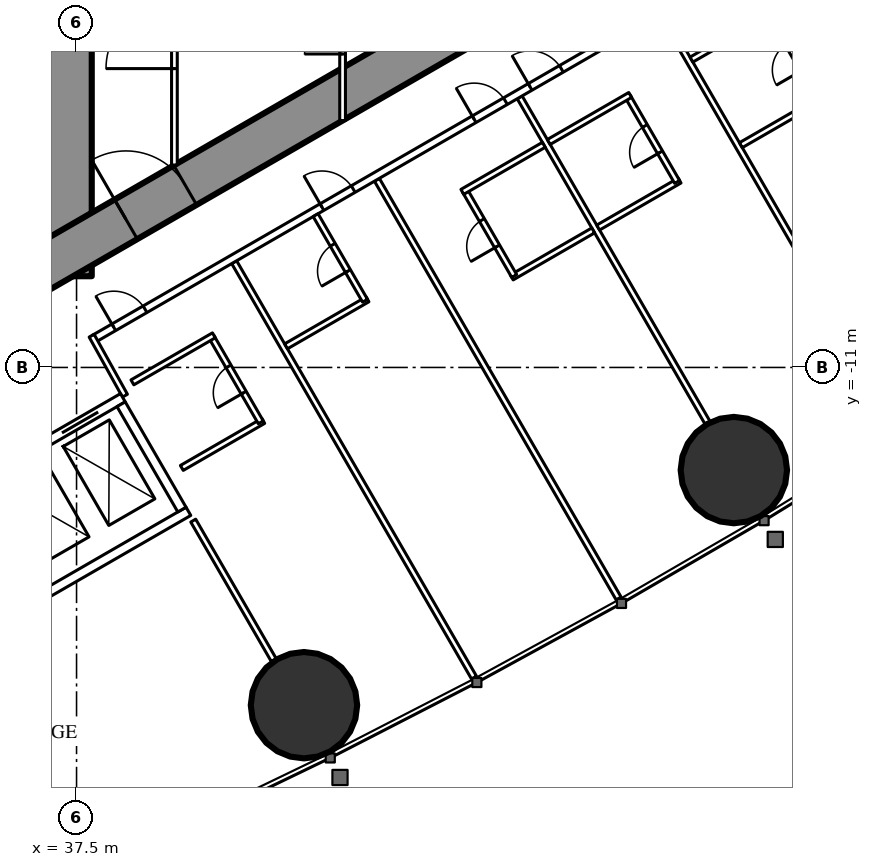
"""IFC4 building model, lengths in metres.
Left out: names, types, materials, properties, quantities, classifications, styles, units other than length and angle.
Written with IfcOpenShell. Run it as: python <this file> out.ifc"""

import sys

from ifc_helpers import new_model, si_unit, direction, frame, frame_2d, origin, origin_2d, place, context, subcontext, project, spatial, rectangle, hollow_circle, extrude, element, fill, save


model = new_model("IFC4")
c1 = context("Model", 3, precision=1e-05, world=origin(), true_north=direction((0.0, 1.0)))
c2 = subcontext(c1, "Body", "Model", "MODEL_VIEW")
j1 = project(units=[si_unit("LENGTHUNIT", "METRE"), si_unit("PLANEANGLEUNIT", "RADIAN")], contexts=[c1])
p1 = place(None, origin())
s1 = spatial("IfcSite", under=j1, at=p1, CompositionType="ELEMENT")
p2 = place(p1, origin())
s2 = spatial("IfcBuilding", under=s1, at=p2, CompositionType="ELEMENT")
p3 = place(p2, frame((0.0, 0.0, 49.5)))
s3 = spatial("IfcBuildingStorey", under=s2, at=p3, CompositionType="ELEMENT", Elevation=49.5)
for number, where, z_axis, x_axis in (
    (1, (43.484, -19.886, 0.0), (0.0, 0.0, 1.0), (1.0, 0.0, 0.0)),
    (2, (54.795, -13.701, 0.0), (0.0, 0.0, 1.0), (1.0, 0.0, 0.0)),
):
    element("IfcColumn", number, at=place(p3, frame(where, z_axis=z_axis, x_axis=x_axis)), inside=s3, PredefinedType="COLUMN", context=c2, shape_type="SweptSolid", body=[
        extrude(hollow_circle(Radius=1.4, WallThickness=0.12, at=origin_2d()), origin(), (0.0, 0.0, 1.0), 3.5),
    ])
p4 = place(p3, frame((37.3, -8.6, 0.0), z_axis=(0.0, 0.0, 1.0), x_axis=(0.0, 1.0, 0.0)))
e3 = element("IfcWall", 3, at=p4, inside=s3, PredefinedType="SHEAR", context=c2, shape_type="SweptSolid", body=[
    extrude(rectangle(XDim=17.2, YDim=1.2, at=frame_2d((8.6, 0.0))), origin(), (0.0, 0.0, 1.0), 3.5),
])
p5 = place(p4, frame((7.7, 0.0, 0.0)))
e4 = element("IfcOpeningElement", 4, at=p5, cuts=e3, PredefinedType="OPENING", context=c2, shape_type="SweptSolid", body=[
    extrude(rectangle(XDim=1.8, YDim=2.2, at=frame_2d((0.9, 1.1))), frame((0.0, 0.61, 0.0), z_axis=(0.0, -1.0, 0.0), x_axis=(1.0, 0.0, 0.0)), (0.0, 0.0, 1.0), 1.22),
])
p6 = place(p3, frame((27.2, -13.8, 0.0), z_axis=(0.0, 0.0, 1.0), x_axis=(0.866027159892, 0.499996958321, 0.0)))
e5 = element("IfcWall", 5, at=p6, inside=s3, PredefinedType="SHEAR", context=c2, shape_type="SweptSolid", body=[
    extrude(rectangle(XDim=27.947, YDim=1.2, at=frame_2d((13.973, 0.0))), origin(), (0.0, 0.0, 1.0), 3.5),
])
p7 = place(p6, frame((4.6, 0.0, 0.0)))
e6 = element("IfcOpeningElement", 6, at=p7, cuts=e5, PredefinedType="OPENING", context=c2, shape_type="SweptSolid", body=[
    extrude(rectangle(XDim=1.0, YDim=2.2, at=frame_2d((0.5, 1.1))), frame((0.0, 0.61, 0.0), z_axis=(0.0, -1.0, 0.0), x_axis=(1.0, 0.0, 0.0)), (0.0, 0.0, 1.0), 1.22),
])
p8 = place(p6, frame((13.395, 0.0, 0.0)))
e7 = element("IfcOpeningElement", 7, at=p8, cuts=e5, PredefinedType="OPENING", context=c2, shape_type="SweptSolid", body=[
    extrude(rectangle(XDim=1.8, YDim=2.2, at=frame_2d((0.9, 1.1))), frame((0.0, 0.61, 0.0), z_axis=(0.0, -1.0, 0.0), x_axis=(1.0, 0.0, 0.0)), (0.0, 0.0, 1.0), 1.22),
])
p9 = place(p3, frame((41.647, -8.23, 0.0), z_axis=(0.0, 0.0, 1.0), x_axis=(0.49998590462, -0.866033541603, 0.0)))
e8 = element("IfcWall", 8, at=p9, inside=s3, PredefinedType="PARTITIONING", context=c2, shape_type="SweptSolid", body=[
    extrude(rectangle(XDim=12.621, YDim=0.15, at=frame_2d((6.311, 0.0))), origin(), (0.0, 0.0, 1.0), 3.25),
])
p10 = place(p3, frame((45.403, -6.062, 0.0), z_axis=(0.0, 0.0, 1.0), x_axis=(0.500007077968, -0.866021317279, 0.0)))
e9 = element("IfcWall", 9, at=p10, inside=s3, PredefinedType="PARTITIONING", context=c2, shape_type="SweptSolid", body=[
    extrude(rectangle(XDim=12.721, YDim=0.15, at=frame_2d((6.361, 0.0))), origin(), (0.0, 0.0, 1.0), 3.25),
])
p11 = place(p3, frame((49.159, -3.893, 0.0), z_axis=(0.0, 0.0, 1.0), x_axis=(0.499998773722, -0.866026111775, 0.0)))
e10 = element("IfcWall", 10, at=p11, inside=s3, PredefinedType="PARTITIONING", context=c2, shape_type="SweptSolid", body=[
    extrude(rectangle(XDim=9.892, YDim=0.15, at=frame_2d((4.946, 0.0))), origin(), (0.0, 0.0, 1.0), 2.25),
])
p12 = place(p3, frame((52.915, -1.725, 0.0), z_axis=(0.0, 0.0, 1.0), x_axis=(0.499997163113, -0.866027041656, 0.0)))
e11 = element("IfcWall", 11, at=p12, inside=s3, PredefinedType="PARTITIONING", context=c2, shape_type="SweptSolid", body=[
    extrude(rectangle(XDim=12.591, YDim=0.15, at=frame_2d((6.295, 0.0))), origin(), (0.0, 0.0, 1.0), 3.25),
])
p13 = place(p3, frame((40.57, -15.03, 0.0), z_axis=(0.0, 0.0, 1.0), x_axis=(0.500012993597, -0.866017901798, 0.0)))
e12 = element("IfcWall", 12, at=p13, inside=s3, PredefinedType="PARTITIONING", context=c2, shape_type="SweptSolid", body=[
    extrude(rectangle(XDim=4.243, YDim=0.15, at=frame_2d((2.122, 0.0))), origin(), (0.0, 0.0, 1.0), 3.25),
])
p14 = place(p3, frame((37.96, -10.243, 0.0), z_axis=(0.0, 0.0, 1.0), x_axis=(0.866026429433, 0.499998223521, 0.0)))
e13 = element("IfcWall", 13, at=p14, inside=s3, PredefinedType="PARTITIONING", context=c2, shape_type="SweptSolid", body=[
    extrude(rectangle(XDim=20.487, YDim=0.2, at=frame_2d((10.243, 0.0))), origin(), (0.0, 0.0, 1.0), 3.25),
])
p15 = place(p14, frame((6.925, 0.0, 0.0)))
e14 = element("IfcOpeningElement", 14, at=p15, cuts=e13, PredefinedType="OPENING", context=c2, shape_type="SweptSolid", body=[
    extrude(rectangle(XDim=0.95, YDim=2.2, at=frame_2d((0.475, 1.1))), frame((0.0, 0.11, 0.0), z_axis=(0.0, -1.0, 0.0), x_axis=(1.0, 0.0, 0.0)), (0.0, 0.0, 1.0), 0.22),
])
p16 = place(p14, frame((11.549, 0.0, 0.0)))
e15 = element("IfcOpeningElement", 15, at=p16, cuts=e13, PredefinedType="OPENING", context=c2, shape_type="SweptSolid", body=[
    extrude(rectangle(XDim=0.95, YDim=2.2, at=frame_2d((0.475, 1.1))), frame((0.0, 0.11, 0.0), z_axis=(0.0, -1.0, 0.0), x_axis=(1.0, 0.0, 0.0)), (0.0, 0.0, 1.0), 0.22),
])
p17 = place(p14, frame((13.249, 0.0, 0.0)))
e16 = element("IfcOpeningElement", 16, at=p17, cuts=e13, PredefinedType="OPENING", context=c2, shape_type="SweptSolid", body=[
    extrude(rectangle(XDim=0.95, YDim=2.2, at=frame_2d((0.475, 1.1))), frame((0.0, 0.11, 0.0), z_axis=(0.0, -1.0, 0.0), x_axis=(1.0, 0.0, 0.0)), (0.0, 0.0, 1.0), 0.22),
])
p18 = place(p14, frame((17.585, 0.0, 0.0)))
e17 = element("IfcOpeningElement", 17, at=p18, cuts=e13, PredefinedType="OPENING", context=c2, shape_type="SweptSolid", body=[
    extrude(rectangle(XDim=0.95, YDim=2.2, at=frame_2d((0.475, 1.1))), frame((0.0, 0.11, 0.0), z_axis=(0.0, -1.0, 0.0), x_axis=(1.0, 0.0, 0.0)), (0.0, 0.0, 1.0), 0.22),
])
p19 = place(p14, frame((0.6, 0.0, 0.0)))
e18 = element("IfcOpeningElement", 18, at=p19, cuts=e13, PredefinedType="OPENING", context=c2, shape_type="SweptSolid", body=[
    extrude(rectangle(XDim=0.95, YDim=2.2, at=frame_2d((0.475, 1.1))), frame((0.0, 0.11, 0.0), z_axis=(0.0, -1.0, 0.0), x_axis=(1.0, 0.0, 0.0)), (0.0, 0.0, 1.0), 0.22),
])
p20 = place(p3, frame((38.773, -11.742, 0.0), z_axis=(0.0, 0.0, 1.0), x_axis=(-0.485528096672, 0.8742210632, 0.0)))
e19 = element("IfcWall", 19, at=p20, inside=s3, PredefinedType="PARTITIONING", context=c2, shape_type="SweptSolid", body=[
    extrude(rectangle(XDim=1.805, YDim=0.15, at=frame_2d((0.903, 0.0))), origin(), (0.0, 0.0, 1.0), 3.25),
])
p21 = place(p3, frame((43.012, -10.444, 0.0), z_axis=(0.0, 0.0, 1.0), x_axis=(0.866031185235, 0.4999899861, 0.0)))
e20 = element("IfcWall", 20, at=p21, inside=s3, PredefinedType="PARTITIONING", context=c2, shape_type="SweptSolid", body=[
    extrude(rectangle(XDim=2.475, YDim=0.15, at=frame_2d((1.238, 0.0))), origin(), (0.0, 0.0, 1.0), 3.25),
])
p22 = place(p3, frame((43.791, -6.993, 0.0), z_axis=(0.0, 0.0, 1.0), x_axis=(0.500047596559, -0.865997922154, 0.0)))
e21 = element("IfcWall", 21, at=p22, inside=s3, PredefinedType="PARTITIONING", context=c2, shape_type="SweptSolid", body=[
    extrude(rectangle(XDim=2.6, YDim=0.15, at=frame_2d((1.3, 0.0))), origin(), (0.0, 0.0, 1.0), 3.25),
])
p23 = place(p22, frame((0.9, 0.0, 0.0)))
e22 = element("IfcOpeningElement", 22, at=p23, cuts=e21, PredefinedType="OPENING", context=c2, shape_type="SweptSolid", body=[
    extrude(rectangle(XDim=0.8, YDim=2.2, at=frame_2d((0.4, 1.1))), frame((0.0, 0.085, 0.0), z_axis=(0.0, -1.0, 0.0), x_axis=(1.0, 0.0, 0.0)), (0.0, 0.0, 1.0), 0.17),
])
p24 = place(p3, frame((48.951, -8.632, 0.0), z_axis=(0.0, 0.0, 1.0), x_axis=(0.866006523861, 0.500032699561, 0.0)))
e23 = element("IfcWall", 23, at=p24, inside=s3, PredefinedType="PARTITIONING", context=c2, shape_type="SweptSolid", body=[
    extrude(rectangle(XDim=2.475, YDim=0.15, at=frame_2d((1.237, 0.0))), origin(), (0.0, 0.0, 1.0), 3.25),
])
p25 = place(p3, frame((47.716, -6.343, 0.0), z_axis=(0.0, 0.0, 1.0), x_axis=(0.500006934395, -0.866021400173, 0.0)))
e24 = element("IfcWall", 24, at=p25, inside=s3, PredefinedType="PARTITIONING", context=c2, shape_type="SweptSolid", body=[
    extrude(rectangle(XDim=2.6, YDim=0.15, at=frame_2d((1.3, 0.0))), origin(), (0.0, 0.0, 1.0), 3.25),
])
p26 = place(p25, frame((0.9, 0.0, 0.0)))
e25 = element("IfcOpeningElement", 25, at=p26, cuts=e24, PredefinedType="OPENING", context=c2, shape_type="SweptSolid", body=[
    extrude(rectangle(XDim=0.8, YDim=2.2, at=frame_2d((0.4, 1.1))), frame((0.0, 0.085, 0.0), z_axis=(0.0, -1.0, 0.0), x_axis=(1.0, 0.0, 0.0)), (0.0, 0.0, 1.0), 0.17),
])
for number, where, z_axis, x_axis in (
    (26, (47.651, -6.38, 0.0), (0.0, 0.0, 1.0), (0.866, 0.5, 0.0)),
    (27, (51.224, -7.32, 0.0), (0.0, 0.0, 1.0), (0.866, 0.5, 0.0)),
):
    element("IfcWall", number, at=place(p3, frame(where, z_axis=z_axis, x_axis=x_axis)), inside=s3, PredefinedType="PARTITIONING", context=c2, shape_type="SweptSolid", body=[
        extrude(rectangle(XDim=2.475, YDim=0.15, at=frame_2d((1.238, 0.0))), origin(), (0.0, 0.0, 1.0), 3.25),
    ])
p27 = place(p3, frame((52.003, -3.868, 0.0), z_axis=(0.0, 0.0, 1.0), x_axis=(0.500047596559, -0.865997922154, 0.0)))
e28 = element("IfcWall", 28, at=p27, inside=s3, PredefinedType="PARTITIONING", context=c2, shape_type="SweptSolid", body=[
    extrude(rectangle(XDim=2.6, YDim=0.15, at=frame_2d((1.3, 0.0))), origin(), (0.0, 0.0, 1.0), 3.25),
])
p28 = place(p27, frame((0.9, 0.0, 0.0)))
e29 = element("IfcOpeningElement", 29, at=p28, cuts=e28, PredefinedType="OPENING", context=c2, shape_type="SweptSolid", body=[
    extrude(rectangle(XDim=0.8, YDim=2.2, at=frame_2d((0.4, 1.1))), frame((0.0, 0.085, 0.0), z_axis=(0.0, -1.0, 0.0), x_axis=(1.0, 0.0, 0.0)), (0.0, 0.0, 1.0), 0.17),
])
for number, where, z_axis, x_axis in (
    (30, (49.925, -5.068, 0.0), (0.0, 0.0, 1.0), (0.866, 0.5, 0.0)),
    (31, (54.98, -5.151, 0.0), (0.0, 0.0, 1.0), (0.866, 0.5, 0.0)),
):
    element("IfcWall", number, at=place(p3, frame(where, z_axis=z_axis, x_axis=x_axis)), inside=s3, PredefinedType="PARTITIONING", context=c2, shape_type="SweptSolid", body=[
        extrude(rectangle(XDim=2.475, YDim=0.15, at=frame_2d((1.237, 0.0))), origin(), (0.0, 0.0, 1.0), 3.25),
    ])
p29 = place(p3, frame((55.758, -1.7, 0.0), z_axis=(0.0, 0.0, 1.0), x_axis=(0.500006934395, -0.866021400173, 0.0)))
e32 = element("IfcWall", 32, at=p29, inside=s3, PredefinedType="PARTITIONING", context=c2, shape_type="SweptSolid", body=[
    extrude(rectangle(XDim=2.6, YDim=0.15, at=frame_2d((1.3, 0.0))), origin(), (0.0, 0.0, 1.0), 3.25),
])
p30 = place(p29, frame((0.9, 0.0, 0.0)))
e33 = element("IfcOpeningElement", 33, at=p30, cuts=e32, PredefinedType="OPENING", context=c2, shape_type="SweptSolid", body=[
    extrude(rectangle(XDim=0.8, YDim=2.2, at=frame_2d((0.4, 1.1))), frame((0.0, 0.085, 0.0), z_axis=(0.0, -1.0, 0.0), x_axis=(1.0, 0.0, 0.0)), (0.0, 0.0, 1.0), 0.17),
])
p31 = place(p3, frame((53.68, -2.9, 0.0), z_axis=(0.0, 0.0, 1.0), x_axis=(0.866006523861, 0.500032699561, 0.0)))
e34 = element("IfcWall", 34, at=p31, inside=s3, PredefinedType="PARTITIONING", context=c2, shape_type="SweptSolid", body=[
    extrude(rectangle(XDim=2.475, YDim=0.15, at=frame_2d((1.237, 0.0))), origin(), (0.0, 0.0, 1.0), 3.25),
])
p32 = place(p3, frame((40.27, -13.644, 0.0), z_axis=(0.0, 0.0, 1.0), x_axis=(0.866031185235, 0.4999899861, 0.0)))
e35 = element("IfcWall", 35, at=p32, inside=s3, PredefinedType="PARTITIONING", context=c2, shape_type="SweptSolid", body=[
    extrude(rectangle(XDim=2.475, YDim=0.15, at=frame_2d((1.238, 0.0))), origin(), (0.0, 0.0, 1.0), 3.25),
])
p33 = place(p3, frame((41.048, -10.193, 0.0), z_axis=(0.0, 0.0, 1.0), x_axis=(0.500047596559, -0.865997922154, 0.0)))
e36 = element("IfcWall", 36, at=p33, inside=s3, PredefinedType="PARTITIONING", context=c2, shape_type="SweptSolid", body=[
    extrude(rectangle(XDim=2.6, YDim=0.15, at=frame_2d((1.3, 0.0))), origin(), (0.0, 0.0, 1.0), 3.25),
])
p34 = place(p33, frame((0.9, 0.0, 0.0)))
e37 = element("IfcOpeningElement", 37, at=p34, cuts=e36, PredefinedType="OPENING", context=c2, shape_type="SweptSolid", body=[
    extrude(rectangle(XDim=0.8, YDim=2.2, at=frame_2d((0.4, 1.1))), frame((0.0, 0.085, 0.0), z_axis=(0.0, -1.0, 0.0), x_axis=(1.0, 0.0, 0.0)), (0.0, 0.0, 1.0), 0.17),
])
p35 = place(p3, frame((38.97, -11.393, 0.0), z_axis=(0.0, 0.0, 1.0), x_axis=(0.866031185235, 0.4999899861, 0.0)))
e38 = element("IfcWall", 38, at=p35, inside=s3, PredefinedType="PARTITIONING", context=c2, shape_type="SweptSolid", body=[
    extrude(rectangle(XDim=2.475, YDim=0.15, at=frame_2d((1.238, 0.0))), origin(), (0.0, 0.0, 1.0), 3.25),
])
p36 = place(p3, frame((40.075, -5.674, 0.0), z_axis=(0.0, 0.0, 1.0), x_axis=(0.0, 1.0, 0.0)))
e39 = element("IfcWall", 39, at=p36, inside=s3, PredefinedType="PARTITIONING", context=c2, shape_type="SweptSolid", body=[
    extrude(rectangle(XDim=6.874, YDim=0.15, at=frame_2d((3.437, 0.0))), origin(), (0.0, 0.0, 1.0), 3.25),
])
p37 = place(p36, frame((2.537, 0.0, 0.0)))
e40 = element("IfcOpeningElement", 40, at=p37, cuts=e39, PredefinedType="OPENING", context=c2, shape_type="SweptSolid", body=[
    extrude(rectangle(XDim=1.8, YDim=2.2, at=frame_2d((0.9, 1.1))), frame((0.0, 0.085, 0.0), z_axis=(0.0, -1.0, 0.0), x_axis=(1.0, 0.0, 0.0)), (0.0, 0.0, 1.0), 0.17),
])
p38 = place(p3, frame((44.5, -4.505, 0.0), z_axis=(0.0, 0.0, 1.0), x_axis=(0.0, 1.0, 0.0)))
e41 = element("IfcWall", 41, at=p38, inside=s3, PredefinedType="PARTITIONING", context=c2, shape_type="SweptSolid", body=[
    extrude(rectangle(XDim=9.009, YDim=0.15, at=frame_2d((4.505, 0.0))), origin(), (0.0, 0.0, 1.0), 2.45),
])
p39 = place(p38, frame((1.752, 0.0, 0.0)))
e42 = element("IfcOpeningElement", 42, at=p39, cuts=e41, PredefinedType="OPENING", context=c2, shape_type="SweptSolid", body=[
    extrude(rectangle(XDim=1.0, YDim=2.2, at=frame_2d((0.5, 1.1))), frame((0.0, 0.085, 0.0), z_axis=(0.0, -1.0, 0.0), x_axis=(1.0, 0.0, 0.0)), (0.0, 0.0, 1.0), 0.17),
])
p40 = place(p38, frame((6.257, 0.0, 0.0)))
e43 = element("IfcOpeningElement", 43, at=p40, cuts=e41, PredefinedType="OPENING", context=c2, shape_type="SweptSolid", body=[
    extrude(rectangle(XDim=1.0, YDim=2.2, at=frame_2d((0.5, 1.1))), frame((0.0, 0.085, 0.0), z_axis=(0.0, -1.0, 0.0), x_axis=(1.0, 0.0, 0.0)), (0.0, 0.0, 1.0), 0.17),
])
p41 = place(p3, frame((31.271, -16.097, 0.0), z_axis=(0.0, 0.0, 1.0), x_axis=(0.86604045752, 0.499973925258, 0.0)))
e44 = element("IfcWall", 44, at=p41, inside=s3, PredefinedType="PARTITIONING", context=c2, shape_type="SweptSolid", body=[
    extrude(rectangle(XDim=8.6, YDim=0.25, at=frame_2d((4.3, 0.0))), origin(), (0.0, 0.0, 1.0), 3.25),
])
p42 = place(p41, frame((0.75, 0.0, 0.0)))
e45 = element("IfcOpeningElement", 45, at=p42, cuts=e44, PredefinedType="OPENING", context=c2, shape_type="SweptSolid", body=[
    extrude(rectangle(XDim=1.1, YDim=2.2, at=frame_2d((0.55, 1.1))), frame((0.0, 0.135, 0.0), z_axis=(0.0, -1.0, 0.0), x_axis=(1.0, 0.0, 0.0)), (0.0, 0.0, 1.0), 0.27),
])
p43 = place(p41, frame((2.75, 0.0, 0.0)))
e46 = element("IfcOpeningElement", 46, at=p43, cuts=e44, PredefinedType="OPENING", context=c2, shape_type="SweptSolid", body=[
    extrude(rectangle(XDim=1.1, YDim=2.2, at=frame_2d((0.55, 1.1))), frame((0.0, 0.135, 0.0), z_axis=(0.0, -1.0, 0.0), x_axis=(1.0, 0.0, 0.0)), (0.0, 0.0, 1.0), 0.27),
])
p44 = place(p41, frame((4.75, 0.0, 0.0)))
e47 = element("IfcOpeningElement", 47, at=p44, cuts=e44, PredefinedType="OPENING", context=c2, shape_type="SweptSolid", body=[
    extrude(rectangle(XDim=1.1, YDim=2.2, at=frame_2d((0.55, 1.1))), frame((0.0, 0.135, 0.0), z_axis=(0.0, -1.0, 0.0), x_axis=(1.0, 0.0, 0.0)), (0.0, 0.0, 1.0), 0.27),
])
p45 = place(p41, frame((6.75, 0.0, 0.0)))
e48 = element("IfcOpeningElement", 48, at=p45, cuts=e44, PredefinedType="OPENING", context=c2, shape_type="SweptSolid", body=[
    extrude(rectangle(XDim=1.1, YDim=2.2, at=frame_2d((0.55, 1.1))), frame((0.0, 0.135, 0.0), z_axis=(0.0, -1.0, 0.0), x_axis=(1.0, 0.0, 0.0)), (0.0, 0.0, 1.0), 0.27),
])
p46 = place(p3, frame((32.996, -19.086, 0.0), z_axis=(0.0, 0.0, 1.0), x_axis=(0.866028165386, 0.499995216735, 0.0)))
e49 = element("IfcWall", 49, at=p46, inside=s3, PredefinedType="PARTITIONING", context=c2, shape_type="SweptSolid", body=[
    extrude(rectangle(XDim=8.6, YDim=0.25, at=frame_2d((4.3, 0.0))), origin(), (0.0, 0.0, 1.0), 3.25),
])
p47 = place(p3, frame((38.673, -11.968, 0.0), z_axis=(0.0, 0.0, 1.0), x_axis=(0.499929347863, -0.866066190972, 0.0)))
e50 = element("IfcWall", 50, at=p47, inside=s3, PredefinedType="PARTITIONING", context=c2, shape_type="SweptSolid", body=[
    extrude(rectangle(XDim=3.201, YDim=0.25, at=frame_2d((1.6, 0.0))), origin(), (0.0, 0.0, 1.0), 3.25),
])
p48 = place(p23, origin())
e51 = element("IfcDoor", 51, at=p48, inside=s3, OperationType="SINGLE_SWING_RIGHT", PredefinedType="DOOR", context=c2, shape_type="SweptSolid", body=[
    extrude(rectangle(XDim=0.8, YDim=2.2, at=frame_2d((0.4, 1.1))), frame((0.0, 0.025, 0.0), z_axis=(0.0, -1.0, 0.0), x_axis=(1.0, 0.0, 0.0)), (0.0, 0.0, 1.0), 0.05),
])
fill(e22, e51)
p49 = place(p15, origin())
e52 = element("IfcDoor", 52, at=p49, inside=s3, OperationType="SINGLE_SWING_LEFT", PredefinedType="DOOR", context=c2, shape_type="SweptSolid", body=[
    extrude(rectangle(XDim=0.95, YDim=2.2, at=frame_2d((0.475, 1.1))), frame((0.0, 0.025, 0.0), z_axis=(0.0, -1.0, 0.0), x_axis=(1.0, 0.0, 0.0)), (0.0, 0.0, 1.0), 0.05),
])
fill(e14, e52)
p50 = place(p26, origin())
e53 = element("IfcDoor", 53, at=p50, inside=s3, OperationType="SINGLE_SWING_RIGHT", PredefinedType="DOOR", context=c2, shape_type="SweptSolid", body=[
    extrude(rectangle(XDim=0.8, YDim=2.2, at=frame_2d((0.4, 1.1))), frame((0.0, 0.025, 0.0), z_axis=(0.0, -1.0, 0.0), x_axis=(1.0, 0.0, 0.0)), (0.0, 0.0, 1.0), 0.05),
])
fill(e25, e53)
p51 = place(p16, origin())
e54 = element("IfcDoor", 54, at=p51, inside=s3, OperationType="SINGLE_SWING_LEFT", PredefinedType="DOOR", context=c2, shape_type="SweptSolid", body=[
    extrude(rectangle(XDim=0.95, YDim=2.2, at=frame_2d((0.475, 1.1))), frame((0.0, 0.025, 0.0), z_axis=(0.0, -1.0, 0.0), x_axis=(1.0, 0.0, 0.0)), (0.0, 0.0, 1.0), 0.05),
])
fill(e15, e54)
p52 = place(p28, origin())
e55 = element("IfcDoor", 55, at=p52, inside=s3, OperationType="SINGLE_SWING_RIGHT", PredefinedType="DOOR", context=c2, shape_type="SweptSolid", body=[
    extrude(rectangle(XDim=0.8, YDim=2.2, at=frame_2d((0.4, 1.1))), frame((0.0, 0.025, 0.0), z_axis=(0.0, -1.0, 0.0), x_axis=(1.0, 0.0, 0.0)), (0.0, 0.0, 1.0), 0.05),
])
fill(e29, e55)
p53 = place(p17, origin())
e56 = element("IfcDoor", 56, at=p53, inside=s3, OperationType="SINGLE_SWING_LEFT", PredefinedType="DOOR", context=c2, shape_type="SweptSolid", body=[
    extrude(rectangle(XDim=0.95, YDim=2.2, at=frame_2d((0.475, 1.1))), frame((0.0, 0.025, 0.0), z_axis=(0.0, -1.0, 0.0), x_axis=(1.0, 0.0, 0.0)), (0.0, 0.0, 1.0), 0.05),
])
fill(e16, e56)
p54 = place(p30, origin())
e57 = element("IfcDoor", 57, at=p54, inside=s3, OperationType="SINGLE_SWING_RIGHT", PredefinedType="DOOR", context=c2, shape_type="SweptSolid", body=[
    extrude(rectangle(XDim=0.8, YDim=2.2, at=frame_2d((0.4, 1.1))), frame((0.0, 0.025, 0.0), z_axis=(0.0, -1.0, 0.0), x_axis=(1.0, 0.0, 0.0)), (0.0, 0.0, 1.0), 0.05),
])
fill(e33, e57)
p55 = place(p34, origin())
e58 = element("IfcDoor", 58, at=p55, inside=s3, OperationType="SINGLE_SWING_RIGHT", PredefinedType="DOOR", context=c2, shape_type="SweptSolid", body=[
    extrude(rectangle(XDim=0.8, YDim=2.2, at=frame_2d((0.4, 1.1))), frame((0.0, 0.025, 0.0), z_axis=(0.0, -1.0, 0.0), x_axis=(1.0, 0.0, 0.0)), (0.0, 0.0, 1.0), 0.05),
])
fill(e37, e58)
p56 = place(p19, origin())
e59 = element("IfcDoor", 59, at=p56, inside=s3, OperationType="SINGLE_SWING_LEFT", PredefinedType="DOOR", context=c2, shape_type="SweptSolid", body=[
    extrude(rectangle(XDim=0.95, YDim=2.2, at=frame_2d((0.475, 1.1))), frame((0.0, 0.025, 0.0), z_axis=(0.0, -1.0, 0.0), x_axis=(1.0, 0.0, 0.0)), (0.0, 0.0, 1.0), 0.05),
])
fill(e18, e59)
p57 = place(p37, origin())
e60 = element("IfcDoor", 60, at=p57, inside=s3, OperationType="DOUBLE_DOOR_SINGLE_SWING", PredefinedType="DOOR", context=c2, shape_type="SweptSolid", body=[
    extrude(rectangle(XDim=1.8, YDim=2.2, at=frame_2d((0.9, 1.1))), frame((0.0, 0.025, 0.0), z_axis=(0.0, -1.0, 0.0), x_axis=(1.0, 0.0, 0.0)), (0.0, 0.0, 1.0), 0.05),
])
fill(e40, e60)
p58 = place(p39, origin())
e61 = element("IfcDoor", 61, at=p58, inside=s3, OperationType="SINGLE_SWING_LEFT", PredefinedType="DOOR", context=c2, shape_type="SweptSolid", body=[
    extrude(rectangle(XDim=1.0, YDim=2.2, at=frame_2d((0.5, 1.1))), frame((0.0, 0.025, 0.0), z_axis=(0.0, -1.0, 0.0), x_axis=(1.0, 0.0, 0.0)), (0.0, 0.0, 1.0), 0.05),
])
fill(e42, e61)
p59 = place(p8, origin())
e62 = element("IfcDoor", 62, at=p59, inside=s3, OperationType="DOUBLE_DOOR_SINGLE_SWING", PredefinedType="DOOR", context=c2, shape_type="SweptSolid", body=[
    extrude(rectangle(XDim=1.8, YDim=2.2, at=frame_2d((0.9, 1.1))), frame((0.0, 0.025, 0.0), z_axis=(0.0, -1.0, 0.0), x_axis=(1.0, 0.0, 0.0)), (0.0, 0.0, 1.0), 0.05),
])
fill(e7, e62)
p60 = place(p45, origin())
e63 = element("IfcDoor", 63, at=p60, inside=s3, OperationType="DOUBLE_DOOR_SLIDING", PredefinedType="USERDEFINED", context=c2, shape_type="SweptSolid", body=[
    extrude(rectangle(XDim=1.1, YDim=2.2, at=frame_2d((0.55, 1.1))), frame((0.0, 0.025, 0.0), z_axis=(0.0, -1.0, 0.0), x_axis=(1.0, 0.0, 0.0)), (0.0, 0.0, 1.0), 0.05),
])
fill(e48, e63)
save(model, sys.argv[1])
